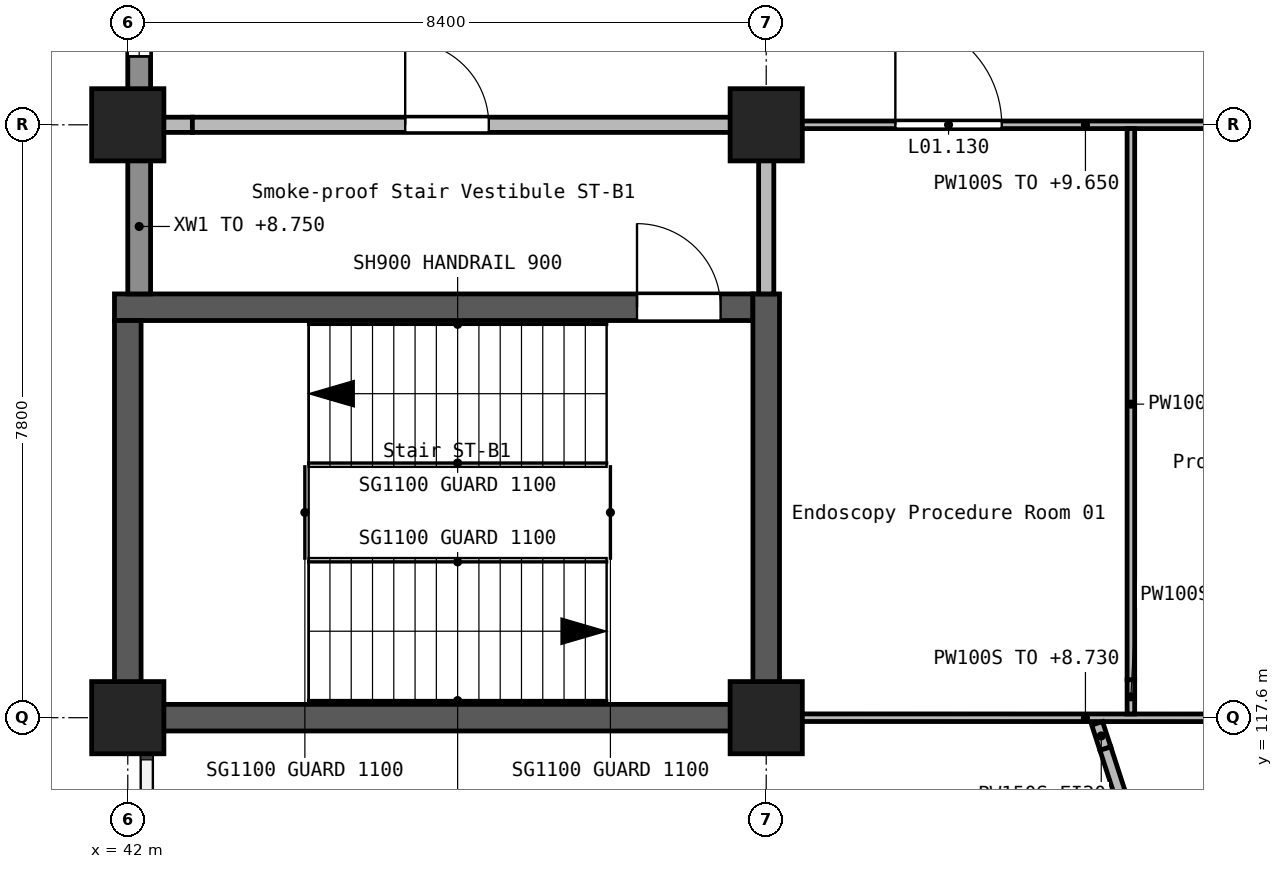
"""IFC4 building model, lengths in metres.
Left out: names, types, materials, properties, quantities, classifications, styles, units other than length and angle.
Written with IfcOpenShell. Run it as: python <this file> out.ifc"""

import sys

from ifc_helpers import new_model, si_unit, direction, frame, frame_2d, origin, origin_2d, place, context, subcontext, project, spatial, rectangle, extrude, element, fill, save


model = new_model("IFC4")
c1 = context("Model", 3, precision=1e-05, world=origin(), true_north=direction((0.0, 1.0)))
c2 = subcontext(c1, "Body", "Model", "MODEL_VIEW")
j1 = project(units=[si_unit("LENGTHUNIT", "METRE"), si_unit("PLANEANGLEUNIT", "RADIAN")], contexts=[c1])
p1 = place(None, origin())
s1 = spatial("IfcSite", under=j1, at=p1, CompositionType="ELEMENT")
p2 = place(p1, origin())
s2 = spatial("IfcBuilding", under=s1, at=p2, CompositionType="ELEMENT")
p3 = place(p2, frame((0.0, 0.0, 5.4)))
s3 = spatial("IfcBuildingStorey", under=s2, at=p3, CompositionType="ELEMENT", Elevation=5.4)
for number, where, z_axis, x_axis in (
    (1, (42.0, 117.6, 0.0), (0.0, 0.0, 1.0), (1.0, 0.0, 0.0)),
    (2, (42.0, 125.4, 0.0), (0.0, 0.0, 1.0), (1.0, 0.0, 0.0)),
    (3, (50.4, 117.6, 0.0), (0.0, 0.0, 1.0), (1.0, 0.0, 0.0)),
    (4, (50.4, 125.4, 0.0), (0.0, 0.0, 1.0), (1.0, 0.0, 0.0)),
):
    element("IfcColumn", number, at=place(p3, frame(where, z_axis=z_axis, x_axis=x_axis)), inside=s3, PredefinedType="COLUMN", context=c2, shape_type="SweptSolid", body=[
        extrude(rectangle(XDim=0.95, YDim=0.95, at=origin_2d()), origin(), (0.0, 0.0, 1.0), 4.5),
    ])
p4 = place(p3, frame((41.825, 123.0, 0.0), z_axis=(0.0, 0.0, 1.0), x_axis=(1.0, 0.0, 0.0)))
e5 = element("IfcWall", 5, at=p4, inside=s3, PredefinedType="SHEAR", context=c2, shape_type="SweptSolid", body=[
    extrude(rectangle(XDim=8.4, YDim=0.35, at=frame_2d((4.2, 0.0))), origin(), (0.0, 0.0, 1.0), 4.5),
])
p5 = place(p4, frame((6.875, 0.0, 0.0)))
e6 = element("IfcOpeningElement", 6, at=p5, cuts=e5, PredefinedType="OPENING", context=c2, shape_type="SweptSolid", body=[
    extrude(rectangle(XDim=1.1, YDim=2.1, at=frame_2d((0.55, 1.05))), frame((0.0, 0.185, 0.0), z_axis=(0.0, -1.0, 0.0), x_axis=(1.0, 0.0, 0.0)), (0.0, 0.0, 1.0), 0.37),
])
p6 = place(p3, frame((42.0, 117.425, 0.0), z_axis=(0.0, 0.0, 1.0), x_axis=(0.0, 1.0, 0.0)))
e7 = element("IfcWall", 7, at=p6, inside=s3, PredefinedType="SHEAR", context=c2, shape_type="SweptSolid", body=[
    extrude(rectangle(XDim=5.4, YDim=0.35, at=frame_2d((2.7, 0.0))), origin(), (0.0, 0.0, 1.0), 4.5),
])
p7 = place(p3, frame((42.175, 117.6, 0.0), z_axis=(0.0, 0.0, 1.0), x_axis=(1.0, 0.0, 0.0)))
e8 = element("IfcWall", 8, at=p7, inside=s3, PredefinedType="SHEAR", context=c2, shape_type="SweptSolid", body=[
    extrude(rectangle(XDim=8.05, YDim=0.35, at=frame_2d((4.025, 0.0))), origin(), (0.0, 0.0, 1.0), 4.5),
])
p8 = place(p3, frame((50.4, 117.425, 0.0), z_axis=(0.0, 0.0, 1.0), x_axis=(0.0, 1.0, 0.0)))
e9 = element("IfcWall", 9, at=p8, inside=s3, PredefinedType="SHEAR", context=c2, shape_type="SweptSolid", body=[
    extrude(rectangle(XDim=5.75, YDim=0.35, at=frame_2d((2.875, 0.0))), origin(), (0.0, 0.0, 1.0), 4.5),
])
p9 = place(p3, frame((42.15, 128.55, 0.0), z_axis=(0.0, 0.0, 1.0), x_axis=(0.0, -1.0, 0.0)))
e10 = element("IfcWall", 10, at=p9, inside=s3, PredefinedType="STANDARD", context=c2, shape_type="SweptSolid", body=[
    extrude(rectangle(XDim=2.7, YDim=0.3, at=frame_2d((1.35, 0.0))), origin(), (0.0, 0.0, 1.0), 3.35),
])
p10 = place(p9, frame((0.45, 0.0, 0.9)))
e11 = element("IfcOpeningElement", 11, at=p10, cuts=e10, PredefinedType="OPENING", context=c2, shape_type="SweptSolid", body=[
    extrude(rectangle(XDim=1.8, YDim=1.5, at=frame_2d((0.9, 0.75))), frame((0.0, 0.16, 0.0), z_axis=(0.0, -1.0, 0.0), x_axis=(1.0, 0.0, 0.0)), (0.0, 0.0, 1.0), 0.32),
])
p11 = place(p3, frame((42.15, 124.95, 0.0), z_axis=(0.0, 0.0, 1.0), x_axis=(0.0, -1.0, 0.0)))
e12 = element("IfcWall", 12, at=p11, inside=s3, PredefinedType="STANDARD", context=c2, shape_type="SweptSolid", body=[
    extrude(rectangle(XDim=1.775, YDim=0.3, at=frame_2d((0.887, 0.0))), origin(), (0.0, 0.0, 1.0), 3.35),
])
p12 = place(p3, frame((42.45, 125.4, 0.0), z_axis=(0.0, 0.0, 1.0), x_axis=(1.0, 0.0, 0.0)))
e13 = element("IfcWall", 13, at=p12, inside=s3, PredefinedType="SOLIDWALL", context=c2, shape_type="SweptSolid", body=[
    extrude(rectangle(XDim=0.4, YDim=0.2, at=frame_2d((0.2, 0.0))), origin(), (0.0, 0.0, 1.0), 3.33),
])
p13 = place(p3, frame((42.85, 125.4, 0.0), z_axis=(0.0, 0.0, 1.0), x_axis=(1.0, 0.0, 0.0)))
e14 = element("IfcWall", 14, at=p13, inside=s3, PredefinedType="SOLIDWALL", context=c2, shape_type="SweptSolid", body=[
    extrude(rectangle(XDim=7.1, YDim=0.2, at=frame_2d((3.55, 0.0))), origin(), (0.0, 0.0, 1.0), 4.25),
])
p14 = place(p13, frame((2.8, 0.0, 0.0)))
e15 = element("IfcOpeningElement", 15, at=p14, cuts=e14, PredefinedType="OPENING", context=c2, shape_type="SweptSolid", body=[
    extrude(rectangle(XDim=1.1, YDim=2.1, at=frame_2d((0.55, 1.05))), frame((0.0, 0.11, 0.0), z_axis=(0.0, -1.0, 0.0), x_axis=(1.0, 0.0, 0.0)), (0.0, 0.0, 1.0), 0.22),
])
p15 = place(p3, frame((50.4, 123.175, 0.0), z_axis=(0.0, 0.0, 1.0), x_axis=(0.0, 1.0, 0.0)))
e16 = element("IfcWall", 16, at=p15, inside=s3, PredefinedType="SOLIDWALL", context=c2, shape_type="SweptSolid", body=[
    extrude(rectangle(XDim=1.775, YDim=0.2, at=frame_2d((0.887, 0.0))), origin(), (0.0, 0.0, 1.0), 4.25),
])
p16 = place(p3, frame((58.35, 117.598, 0.0), z_axis=(0.0, 0.0, 1.0), x_axis=(-0.999999974039, 0.000227864577, 0.0)))
e17 = element("IfcWall", 17, at=p16, inside=s3, PredefinedType="PARTITIONING", context=c2, shape_type="SweptSolid", body=[
    extrude(rectangle(XDim=7.5, YDim=0.1, at=frame_2d((3.75, 0.0))), origin(), (0.0, 0.0, 1.0), 3.33),
])
p17 = place(p3, frame((50.85, 125.4, 0.0), z_axis=(0.0, 0.0, 1.0), x_axis=(1.0, 0.0, 0.0)))
e18 = element("IfcWall", 18, at=p17, inside=s3, PredefinedType="PARTITIONING", context=c2, shape_type="SweptSolid", body=[
    extrude(rectangle(XDim=7.5, YDim=0.1, at=frame_2d((3.75, 0.0))), origin(), (0.0, 0.0, 1.0), 4.25),
])
p18 = place(p17, frame((1.249, 0.0, 0.0)))
e19 = element("IfcOpeningElement", 19, at=p18, cuts=e18, PredefinedType="OPENING", context=c2, shape_type="SweptSolid", body=[
    extrude(rectangle(XDim=1.4, YDim=2.1, at=frame_2d((0.7, 1.05))), frame((0.0, 0.06, 0.0), z_axis=(0.0, -1.0, 0.0), x_axis=(1.0, 0.0, 0.0)), (0.0, 0.0, 1.0), 0.12),
])
p19 = place(p17, frame((5.448, 0.0, 0.0)))
e20 = element("IfcOpeningElement", 20, at=p19, cuts=e18, PredefinedType="OPENING", context=c2, shape_type="SweptSolid", body=[
    extrude(rectangle(XDim=1.4, YDim=2.1, at=frame_2d((0.7, 1.05))), frame((0.0, 0.06, 0.0), z_axis=(0.0, -1.0, 0.0), x_axis=(1.0, 0.0, 0.0)), (0.0, 0.0, 1.0), 0.12),
])
p20 = place(p3, frame((55.198, 117.649, 0.0), z_axis=(0.0, 0.0, 1.0), x_axis=(0.0, 1.0, 0.0)))
e21 = element("IfcWall", 21, at=p20, inside=s3, PredefinedType="PARTITIONING", context=c2, shape_type="SweptSolid", body=[
    extrude(rectangle(XDim=0.451, YDim=0.1, at=frame_2d((0.226, 0.0))), origin(), (0.0, 0.0, 1.0), 3.33),
])
p21 = place(p3, frame((55.198, 118.1, 0.0), z_axis=(0.0, 0.0, 1.0), x_axis=(0.0, 1.0, 0.0)))
e22 = element("IfcWall", 22, at=p21, inside=s3, PredefinedType="PARTITIONING", context=c2, shape_type="SweptSolid", body=[
    extrude(rectangle(XDim=7.25, YDim=0.1, at=frame_2d((3.625, 0.0))), origin(), (0.0, 0.0, 1.0), 4.25),
])
p22 = place(p3, frame((54.754, 117.526, 0.0), z_axis=(0.0, 0.0, 1.0), x_axis=(0.309101849499, -0.951028941009, 0.0)))
e23 = element("IfcWall", 23, at=p22, inside=s3, PredefinedType="PARTITIONING", context=c2, shape_type="SweptSolid", body=[
    extrude(rectangle(XDim=0.35, YDim=0.15, at=frame_2d((0.175, 0.0))), origin(), (0.0, 0.0, 1.0), 4.15),
])
p23 = place(p3, frame((54.862, 117.193, 0.0), z_axis=(0.0, 0.0, 1.0), x_axis=(0.309024959782, -0.951053928141, 0.0)))
e24 = element("IfcWall", 24, at=p23, inside=s3, PredefinedType="PARTITIONING", context=c2, shape_type="SweptSolid", body=[
    extrude(rectangle(XDim=8.491, YDim=0.15, at=frame_2d((4.246, 0.0))), origin(), (0.0, 0.0, 1.0), 4.15),
])
p24 = place(p23, frame((3.494, 0.0, 0.0)))
e25 = element("IfcOpeningElement", 25, at=p24, cuts=e24, PredefinedType="OPENING", context=c2, shape_type="SweptSolid", body=[
    extrude(rectangle(XDim=1.0, YDim=2.1, at=frame_2d((0.5, 1.05))), frame((0.0, 0.085, 0.0), z_axis=(0.0, -1.0, 0.0), x_axis=(1.0, 0.0, 0.0)), (0.0, 0.0, 1.0), 0.17),
])
p25 = place(p10, origin())
e26 = element("IfcWindow", 26, at=p25, inside=s3, PartitioningType="SINGLE_PANEL", PredefinedType="WINDOW", context=c2, shape_type="SweptSolid", body=[
    extrude(rectangle(XDim=1.8, YDim=1.5, at=frame_2d((0.9, 0.75))), frame((0.0, 0.03, 0.0), z_axis=(0.0, -1.0, 0.0), x_axis=(1.0, 0.0, 0.0)), (0.0, 0.0, 1.0), 0.06),
])
fill(e11, e26)
p26 = place(p5, frame((1.1, 0.0, 0.0), z_axis=(0.0, 0.0, 1.0), x_axis=(-1.0, 0.0, 0.0)))
e27 = element("IfcDoor", 27, at=p26, inside=s3, OperationType="SINGLE_SWING_LEFT", PredefinedType="DOOR", context=c2, shape_type="SweptSolid", body=[
    extrude(rectangle(XDim=1.1, YDim=2.1, at=frame_2d((0.55, 1.05))), frame((0.0, 0.025, 0.0), z_axis=(0.0, -1.0, 0.0), x_axis=(1.0, 0.0, 0.0)), (0.0, 0.0, 1.0), 0.05),
])
fill(e6, e27)
p27 = place(p14, frame((1.1, 0.0, 0.0), z_axis=(0.0, 0.0, 1.0), x_axis=(-1.0, 0.0, 0.0)))
e28 = element("IfcDoor", 28, at=p27, inside=s3, OperationType="SINGLE_SWING_RIGHT", PredefinedType="DOOR", context=c2, shape_type="SweptSolid", body=[
    extrude(rectangle(XDim=1.1, YDim=2.1, at=frame_2d((0.55, 1.05))), frame((0.0, 0.025, 0.0), z_axis=(0.0, -1.0, 0.0), x_axis=(1.0, 0.0, 0.0)), (0.0, 0.0, 1.0), 0.05),
])
fill(e15, e28)
p28 = place(p18, frame((1.4, 0.0, 0.0), z_axis=(0.0, 0.0, 1.0), x_axis=(-1.0, 0.0, 0.0)))
e29 = element("IfcDoor", 29, at=p28, inside=s3, OperationType="DOUBLE_DOOR_SINGLE_SWING", PredefinedType="DOOR", context=c2, shape_type="SweptSolid", body=[
    extrude(rectangle(XDim=1.4, YDim=2.1, at=frame_2d((0.7, 1.05))), frame((0.0, 0.025, 0.0), z_axis=(0.0, -1.0, 0.0), x_axis=(1.0, 0.0, 0.0)), (0.0, 0.0, 1.0), 0.05),
])
fill(e19, e29)
save(model, sys.argv[1])
